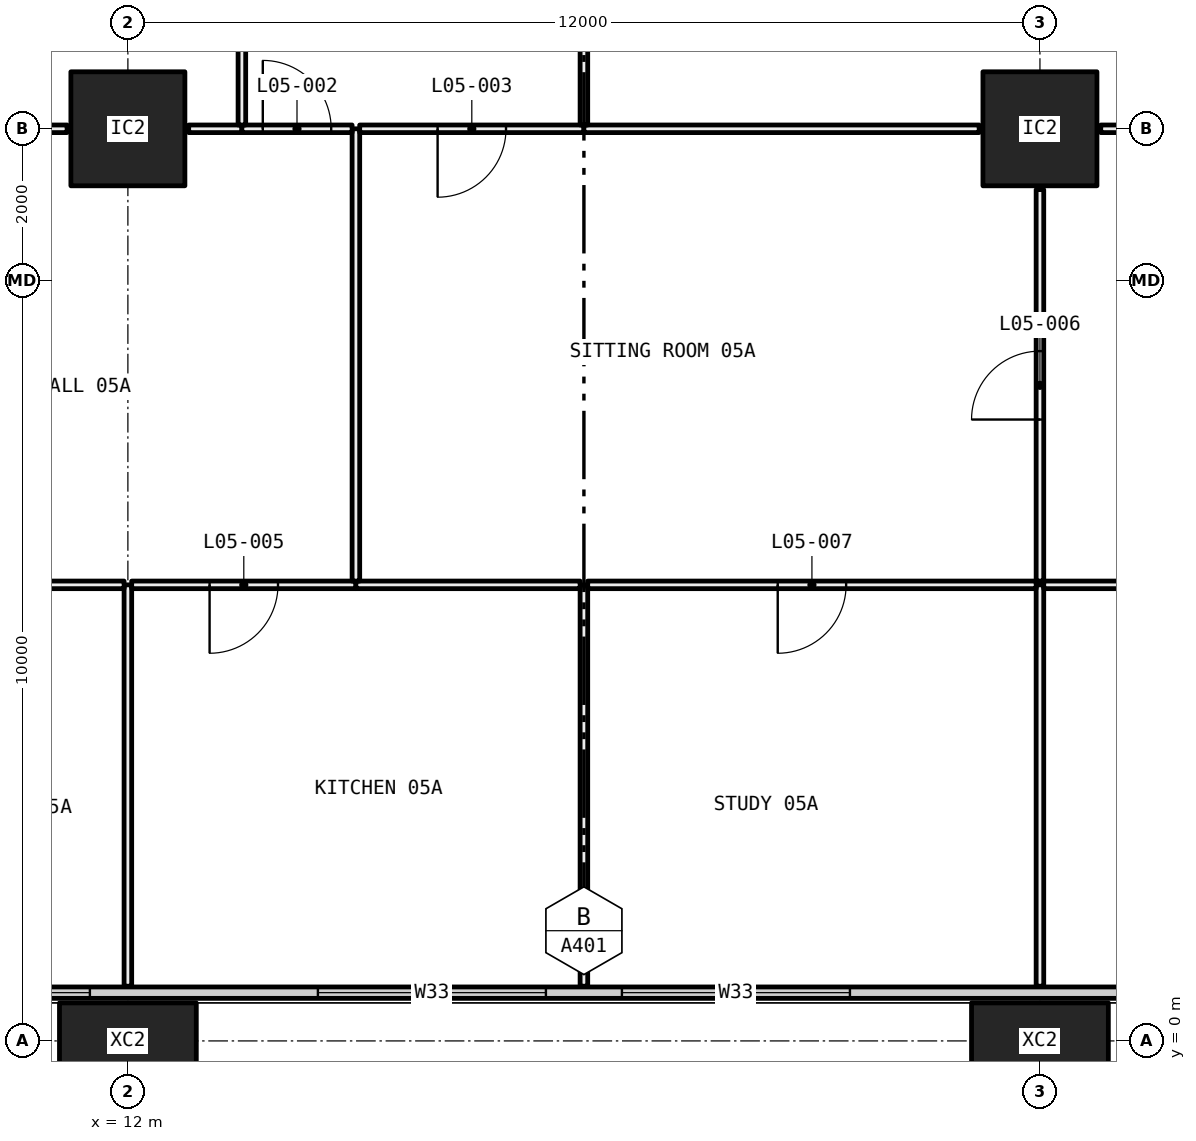
"""IFC4 building model, lengths in metres.
Left out: names, types, materials, properties, quantities, classifications, styles, units other than length and angle.
Written with IfcOpenShell. Run it as: python <this file> out.ifc"""

import sys

from ifc_helpers import new_model, si_unit, direction, frame, frame_2d, origin, origin_2d, place, context, subcontext, project, spatial, rectangle, hollow_rectangle, extrude, element, fill, save


model = new_model("IFC4")
c1 = context("Model", 3, precision=1e-05, world=origin(), true_north=direction((0.0, 1.0)))
c2 = subcontext(c1, "Body", "Model", "MODEL_VIEW")
j1 = project(units=[si_unit("LENGTHUNIT", "METRE"), si_unit("PLANEANGLEUNIT", "RADIAN")], contexts=[c1])
p1 = place(None, origin())
s1 = spatial("IfcSite", under=j1, at=p1, CompositionType="ELEMENT")
p2 = place(p1, origin())
s2 = spatial("IfcBuilding", under=s1, at=p2, CompositionType="ELEMENT")
p3 = place(p2, frame((0.0, 0.0, 30.0)))
s3 = spatial("IfcBuildingStorey", under=s2, at=p3, CompositionType="ELEMENT", Elevation=30.0)
p4 = place(p3, frame((12.0, 0.0, -0.4), z_axis=(0.0, 0.0, 1.0), x_axis=(1.0, 0.0, 0.0)))
e1 = element("IfcColumn", 1, at=p4, inside=s3, PredefinedType="COLUMN", context=c2, shape_type="SweptSolid", body=[
    extrude(hollow_rectangle(XDim=1.8, YDim=1.0, WallThickness=0.07, at=origin_2d()), origin(), (0.0, 0.0, 1.0), 3.45),
])
p5 = place(p3, frame((12.0, 12.0, 0.0), z_axis=(0.0, 0.0, 1.0), x_axis=(1.0, 0.0, 0.0)))
e2 = element("IfcColumn", 2, at=p5, inside=s3, PredefinedType="COLUMN", context=c2, shape_type="SweptSolid", body=[
    extrude(hollow_rectangle(XDim=1.5, YDim=1.5, WallThickness=0.065, at=origin_2d()), origin(), (0.0, 0.0, 1.0), 3.05),
])
p6 = place(p3, frame((24.0, 0.0, -0.4), z_axis=(0.0, 0.0, 1.0), x_axis=(1.0, 0.0, 0.0)))
e3 = element("IfcColumn", 3, at=p6, inside=s3, PredefinedType="COLUMN", context=c2, shape_type="SweptSolid", body=[
    extrude(hollow_rectangle(XDim=1.8, YDim=1.0, WallThickness=0.07, at=origin_2d()), origin(), (0.0, 0.0, 1.0), 3.45),
])
p7 = place(p3, frame((24.0, 12.0, 0.0), z_axis=(0.0, 0.0, 1.0), x_axis=(1.0, 0.0, 0.0)))
e4 = element("IfcColumn", 4, at=p7, inside=s3, PredefinedType="COLUMN", context=c2, shape_type="SweptSolid", body=[
    extrude(hollow_rectangle(XDim=1.5, YDim=1.5, WallThickness=0.065, at=origin_2d()), origin(), (0.0, 0.0, 1.0), 3.05),
])
p8 = place(p3, frame((6.56, 0.635, 0.0), z_axis=(0.0, 0.0, 1.0), x_axis=(1.0, 0.0, 0.0)))
e5 = element("IfcWall", 5, at=p8, inside=s3, PredefinedType="ELEMENTEDWALL", context=c2, shape_type="SweptSolid", body=[
    extrude(rectangle(XDim=58.88, YDim=0.15, at=frame_2d((29.44, 0.0))), origin(), (0.0, 0.0, 1.0), 3.05),
])
p9 = place(p8, frame((0.44, 0.0, 0.45)))
e6 = element("IfcOpeningElement", 6, at=p9, cuts=e5, PredefinedType="OPENING", context=c2, shape_type="SweptSolid", body=[
    extrude(rectangle(XDim=4.5, YDim=2.55, at=frame_2d((2.25, 1.275))), frame((0.0, 0.085, 0.0), z_axis=(0.0, -1.0, 0.0), x_axis=(1.0, 0.0, 0.0)), (0.0, 0.0, 1.0), 0.17),
])
p10 = place(p8, frame((7.94, 0.0, 0.45)))
e7 = element("IfcOpeningElement", 7, at=p10, cuts=e5, PredefinedType="OPENING", context=c2, shape_type="SweptSolid", body=[
    extrude(rectangle(XDim=3.0, YDim=2.55, at=frame_2d((1.5, 1.275))), frame((0.0, 0.085, 0.0), z_axis=(0.0, -1.0, 0.0), x_axis=(1.0, 0.0, 0.0)), (0.0, 0.0, 1.0), 0.17),
])
p11 = place(p8, frame((11.94, 0.0, 0.45)))
e8 = element("IfcOpeningElement", 8, at=p11, cuts=e5, PredefinedType="OPENING", context=c2, shape_type="SweptSolid", body=[
    extrude(rectangle(XDim=3.0, YDim=2.55, at=frame_2d((1.5, 1.275))), frame((0.0, 0.085, 0.0), z_axis=(0.0, -1.0, 0.0), x_axis=(1.0, 0.0, 0.0)), (0.0, 0.0, 1.0), 0.17),
])
p12 = place(p8, frame((19.94, 0.0, 0.45)))
e9 = element("IfcOpeningElement", 9, at=p12, cuts=e5, PredefinedType="OPENING", context=c2, shape_type="SweptSolid", body=[
    extrude(rectangle(XDim=3.0, YDim=2.55, at=frame_2d((1.5, 1.275))), frame((0.0, 0.085, 0.0), z_axis=(0.0, -1.0, 0.0), x_axis=(1.0, 0.0, 0.0)), (0.0, 0.0, 1.0), 0.17),
])
p13 = place(p8, frame((23.94, 0.0, 0.45)))
e10 = element("IfcOpeningElement", 10, at=p13, cuts=e5, PredefinedType="OPENING", context=c2, shape_type="SweptSolid", body=[
    extrude(rectangle(XDim=2.0, YDim=2.55, at=frame_2d((1.0, 1.275))), frame((0.0, 0.085, 0.0), z_axis=(0.0, -1.0, 0.0), x_axis=(1.0, 0.0, 0.0)), (0.0, 0.0, 1.0), 0.17),
])
p14 = place(p8, frame((31.94, 0.0, 0.45)))
e11 = element("IfcOpeningElement", 11, at=p14, cuts=e5, PredefinedType="OPENING", context=c2, shape_type="SweptSolid", body=[
    extrude(rectangle(XDim=3.0, YDim=2.55, at=frame_2d((1.5, 1.275))), frame((0.0, 0.085, 0.0), z_axis=(0.0, -1.0, 0.0), x_axis=(1.0, 0.0, 0.0)), (0.0, 0.0, 1.0), 0.17),
])
p15 = place(p8, frame((35.94, 0.0, 0.45)))
e12 = element("IfcOpeningElement", 12, at=p15, cuts=e5, PredefinedType="OPENING", context=c2, shape_type="SweptSolid", body=[
    extrude(rectangle(XDim=3.0, YDim=2.55, at=frame_2d((1.5, 1.275))), frame((0.0, 0.085, 0.0), z_axis=(0.0, -1.0, 0.0), x_axis=(1.0, 0.0, 0.0)), (0.0, 0.0, 1.0), 0.17),
])
p16 = place(p8, frame((43.94, 0.0, 0.45)))
e13 = element("IfcOpeningElement", 13, at=p16, cuts=e5, PredefinedType="OPENING", context=c2, shape_type="SweptSolid", body=[
    extrude(rectangle(XDim=3.0, YDim=2.55, at=frame_2d((1.5, 1.275))), frame((0.0, 0.085, 0.0), z_axis=(0.0, -1.0, 0.0), x_axis=(1.0, 0.0, 0.0)), (0.0, 0.0, 1.0), 0.17),
])
p17 = place(p8, frame((47.94, 0.0, 0.45)))
e14 = element("IfcOpeningElement", 14, at=p17, cuts=e5, PredefinedType="OPENING", context=c2, shape_type="SweptSolid", body=[
    extrude(rectangle(XDim=2.0, YDim=2.55, at=frame_2d((1.0, 1.275))), frame((0.0, 0.085, 0.0), z_axis=(0.0, -1.0, 0.0), x_axis=(1.0, 0.0, 0.0)), (0.0, 0.0, 1.0), 0.17),
])
p18 = place(p8, frame((53.94, 0.0, 0.45)))
e15 = element("IfcOpeningElement", 15, at=p18, cuts=e5, PredefinedType="OPENING", context=c2, shape_type="SweptSolid", body=[
    extrude(rectangle(XDim=4.5, YDim=2.55, at=frame_2d((2.25, 1.275))), frame((0.0, 0.085, 0.0), z_axis=(0.0, -1.0, 0.0), x_axis=(1.0, 0.0, 0.0)), (0.0, 0.0, 1.0), 0.17),
])
p19 = place(p3, frame((12.0, 0.72, 0.0), z_axis=(0.0, 0.0, 1.0), x_axis=(0.0, 1.0, 0.0)))
e16 = element("IfcWall", 16, at=p19, inside=s3, PredefinedType="PARTITIONING", context=c2, shape_type="SweptSolid", body=[
    extrude(rectangle(XDim=5.28, YDim=0.1, at=frame_2d((2.64, 0.0))), origin(), (0.0, 0.0, 1.0), 2.45),
])
p20 = place(p3, frame((11.95, 6.0, 0.0), z_axis=(0.0, 0.0, 1.0), x_axis=(-1.0, 0.0, 0.0)))
e17 = element("IfcWall", 17, at=p20, inside=s3, PredefinedType="PARTITIONING", context=c2, shape_type="SweptSolid", body=[
    extrude(rectangle(XDim=5.23, YDim=0.1, at=frame_2d((2.615, 0.0))), origin(), (0.0, 0.0, 1.0), 2.45),
])
p21 = place(p20, frame((2.165, 0.0, 0.0)))
e18 = element("IfcOpeningElement", 18, at=p21, cuts=e17, PredefinedType="OPENING", context=c2, shape_type="SweptSolid", body=[
    extrude(rectangle(XDim=0.9, YDim=2.1, at=frame_2d((0.45, 1.05))), frame((0.0, 0.06, 0.0), z_axis=(0.0, -1.0, 0.0), x_axis=(1.0, 0.0, 0.0)), (0.0, 0.0, 1.0), 0.12),
])
p22 = place(p3, frame((18.0, 0.72, 0.0), z_axis=(0.0, 0.0, 1.0), x_axis=(0.0, 1.0, 0.0)))
e19 = element("IfcWall", 19, at=p22, inside=s3, PredefinedType="PARTITIONING", context=c2, shape_type="SweptSolid", body=[
    extrude(rectangle(XDim=5.28, YDim=0.1, at=frame_2d((2.64, 0.0))), origin(), (0.0, 0.0, 1.0), 3.05),
])
p23 = place(p3, frame((15.0, 6.0, 0.0), z_axis=(0.0, 0.0, 1.0), x_axis=(-1.0, 0.0, 0.0)))
e20 = element("IfcWall", 20, at=p23, inside=s3, PredefinedType="PARTITIONING", context=c2, shape_type="SweptSolid", body=[
    extrude(rectangle(XDim=2.95, YDim=0.1, at=frame_2d((1.475, 0.0))), origin(), (0.0, 0.0, 1.0), 2.45),
])
p24 = place(p23, frame((1.025, 0.0, 0.0)))
e21 = element("IfcOpeningElement", 21, at=p24, cuts=e20, PredefinedType="OPENING", context=c2, shape_type="SweptSolid", body=[
    extrude(rectangle(XDim=0.9, YDim=2.1, at=frame_2d((0.45, 1.05))), frame((0.0, 0.06, 0.0), z_axis=(0.0, -1.0, 0.0), x_axis=(1.0, 0.0, 0.0)), (0.0, 0.0, 1.0), 0.12),
])
p25 = place(p3, frame((17.95, 6.0, 0.0), z_axis=(0.0, 0.0, 1.0), x_axis=(-1.0, 0.0, 0.0)))
e22 = element("IfcWall", 22, at=p25, inside=s3, PredefinedType="PARTITIONING", context=c2, shape_type="SweptSolid", body=[
    extrude(rectangle(XDim=2.95, YDim=0.1, at=frame_2d((1.475, 0.0))), origin(), (0.0, 0.0, 1.0), 3.05),
])
p26 = place(p3, frame((24.0, 0.72, 0.0), z_axis=(0.0, 0.0, 1.0), x_axis=(0.0, 1.0, 0.0)))
e23 = element("IfcWall", 23, at=p26, inside=s3, PredefinedType="PARTITIONING", context=c2, shape_type="SweptSolid", body=[
    extrude(rectangle(XDim=5.28, YDim=0.1, at=frame_2d((2.64, 0.0))), origin(), (0.0, 0.0, 1.0), 2.45),
])
p27 = place(p3, frame((23.95, 6.0, 0.0), z_axis=(0.0, 0.0, 1.0), x_axis=(-1.0, 0.0, 0.0)))
e24 = element("IfcWall", 24, at=p27, inside=s3, PredefinedType="PARTITIONING", context=c2, shape_type="SweptSolid", body=[
    extrude(rectangle(XDim=5.9, YDim=0.1, at=frame_2d((2.95, 0.0))), origin(), (0.0, 0.0, 1.0), 2.45),
])
p28 = place(p27, frame((2.5, 0.0, 0.0)))
e25 = element("IfcOpeningElement", 25, at=p28, cuts=e24, PredefinedType="OPENING", context=c2, shape_type="SweptSolid", body=[
    extrude(rectangle(XDim=0.9, YDim=2.1, at=frame_2d((0.45, 1.05))), frame((0.0, 0.06, 0.0), z_axis=(0.0, -1.0, 0.0), x_axis=(1.0, 0.0, 0.0)), (0.0, 0.0, 1.0), 0.12),
])
p29 = place(p3, frame((29.95, 6.0, 0.0), z_axis=(0.0, 0.0, 1.0), x_axis=(-1.0, 0.0, 0.0)))
e26 = element("IfcWall", 26, at=p29, inside=s3, PredefinedType="PARTITIONING", context=c2, shape_type="SweptSolid", body=[
    extrude(rectangle(XDim=5.9, YDim=0.1, at=frame_2d((2.95, 0.0))), origin(), (0.0, 0.0, 1.0), 2.45),
])
p30 = place(p29, frame((2.5, 0.0, 0.0)))
e27 = element("IfcOpeningElement", 27, at=p30, cuts=e26, PredefinedType="OPENING", context=c2, shape_type="SweptSolid", body=[
    extrude(rectangle(XDim=0.9, YDim=2.1, at=frame_2d((0.45, 1.05))), frame((0.0, 0.06, 0.0), z_axis=(0.0, -1.0, 0.0), x_axis=(1.0, 0.0, 0.0)), (0.0, 0.0, 1.0), 0.12),
])
p31 = place(p3, frame((15.0, 6.05, 0.0), z_axis=(0.0, 0.0, 1.0), x_axis=(0.0, 1.0, 0.0)))
e28 = element("IfcWall", 28, at=p31, inside=s3, PredefinedType="PARTITIONING", context=c2, shape_type="SweptSolid", body=[
    extrude(rectangle(XDim=5.95, YDim=0.1, at=frame_2d((2.975, 0.0))), origin(), (0.0, 0.0, 1.0), 2.45),
])
p32 = place(p3, frame((11.2, 12.0, 0.0), z_axis=(0.0, 0.0, 1.0), x_axis=(-1.0, 0.0, 0.0)))
e29 = element("IfcWall", 29, at=p32, inside=s3, PredefinedType="PARTITIONING", context=c2, shape_type="SweptSolid", body=[
    extrude(rectangle(XDim=5.15, YDim=0.1, at=frame_2d((2.575, 0.0))), origin(), (0.0, 0.0, 1.0), 2.45),
])
p33 = place(p32, frame((2.125, 0.0, 0.0)))
e30 = element("IfcOpeningElement", 30, at=p33, cuts=e29, PredefinedType="OPENING", context=c2, shape_type="SweptSolid", body=[
    extrude(rectangle(XDim=0.9, YDim=2.1, at=frame_2d((0.45, 1.05))), frame((0.0, 0.06, 0.0), z_axis=(0.0, -1.0, 0.0), x_axis=(1.0, 0.0, 0.0)), (0.0, 0.0, 1.0), 0.12),
])
p34 = place(p3, frame((13.5, 12.0, 0.0), z_axis=(0.0, 0.0, 1.0), x_axis=(-1.0, 0.0, 0.0)))
e31 = element("IfcWall", 31, at=p34, inside=s3, PredefinedType="PARTITIONING", context=c2, shape_type="SweptSolid", body=[
    extrude(rectangle(XDim=0.7, YDim=0.1, at=frame_2d((0.35, 0.0))), origin(), (0.0, 0.0, 1.0), 2.45),
])
p35 = place(p3, frame((14.95, 12.0, 0.0), z_axis=(0.0, 0.0, 1.0), x_axis=(-1.0, 0.0, 0.0)))
e32 = element("IfcWall", 32, at=p35, inside=s3, PredefinedType="PARTITIONING", context=c2, shape_type="SweptSolid", body=[
    extrude(rectangle(XDim=1.45, YDim=0.1, at=frame_2d((0.725, 0.0))), origin(), (0.0, 0.0, 1.0), 2.45),
])
p36 = place(p35, frame((0.275, 0.0, 0.0)))
e33 = element("IfcOpeningElement", 33, at=p36, cuts=e32, PredefinedType="OPENING", context=c2, shape_type="SweptSolid", body=[
    extrude(rectangle(XDim=0.9, YDim=2.1, at=frame_2d((0.45, 1.05))), frame((0.0, 0.06, 0.0), z_axis=(0.0, -1.0, 0.0), x_axis=(1.0, 0.0, 0.0)), (0.0, 0.0, 1.0), 0.12),
])
p37 = place(p3, frame((24.0, 6.05, 0.0), z_axis=(0.0, 0.0, 1.0), x_axis=(0.0, 1.0, 0.0)))
e34 = element("IfcWall", 34, at=p37, inside=s3, PredefinedType="PARTITIONING", context=c2, shape_type="SweptSolid", body=[
    extrude(rectangle(XDim=5.15, YDim=0.1, at=frame_2d((2.575, 0.0))), origin(), (0.0, 0.0, 1.0), 2.45),
])
p38 = place(p37, frame((2.125, 0.0, 0.0)))
e35 = element("IfcOpeningElement", 35, at=p38, cuts=e34, PredefinedType="OPENING", context=c2, shape_type="SweptSolid", body=[
    extrude(rectangle(XDim=0.9, YDim=2.1, at=frame_2d((0.45, 1.05))), frame((0.0, 0.06, 0.0), z_axis=(0.0, -1.0, 0.0), x_axis=(1.0, 0.0, 0.0)), (0.0, 0.0, 1.0), 0.12),
])
p39 = place(p3, frame((18.0, 12.0, 0.0), z_axis=(0.0, 0.0, 1.0), x_axis=(-1.0, 0.0, 0.0)))
e36 = element("IfcWall", 36, at=p39, inside=s3, PredefinedType="PARTITIONING", context=c2, shape_type="SweptSolid", body=[
    extrude(rectangle(XDim=2.95, YDim=0.1, at=frame_2d((1.475, 0.0))), origin(), (0.0, 0.0, 1.0), 2.45),
])
p40 = place(p39, frame((1.025, 0.0, 0.0)))
e37 = element("IfcOpeningElement", 37, at=p40, cuts=e36, PredefinedType="OPENING", context=c2, shape_type="SweptSolid", body=[
    extrude(rectangle(XDim=0.9, YDim=2.1, at=frame_2d((0.45, 1.05))), frame((0.0, 0.06, 0.0), z_axis=(0.0, -1.0, 0.0), x_axis=(1.0, 0.0, 0.0)), (0.0, 0.0, 1.0), 0.12),
])
p41 = place(p3, frame((23.2, 12.0, 0.0), z_axis=(0.0, 0.0, 1.0), x_axis=(-1.0, 0.0, 0.0)))
e38 = element("IfcWall", 38, at=p41, inside=s3, PredefinedType="PARTITIONING", context=c2, shape_type="SweptSolid", body=[
    extrude(rectangle(XDim=5.2, YDim=0.1, at=frame_2d((2.6, 0.0))), origin(), (0.0, 0.0, 1.0), 2.45),
])
p42 = place(p3, frame((27.0, 12.0, 0.0), z_axis=(0.0, 0.0, 1.0), x_axis=(-1.0, 0.0, 0.0)))
e39 = element("IfcWall", 39, at=p42, inside=s3, PredefinedType="PARTITIONING", context=c2, shape_type="SweptSolid", body=[
    extrude(rectangle(XDim=2.2, YDim=0.1, at=frame_2d((1.1, 0.0))), origin(), (0.0, 0.0, 1.0), 2.45),
])
p43 = place(p3, frame((13.5, 12.05, 0.0), z_axis=(0.0, 0.0, 1.0), x_axis=(0.0, 1.0, 0.0)))
e40 = element("IfcWall", 40, at=p43, inside=s3, PredefinedType="PARTITIONING", context=c2, shape_type="SweptSolid", body=[
    extrude(rectangle(XDim=5.85, YDim=0.1, at=frame_2d((2.925, 0.0))), origin(), (0.0, 0.0, 1.0), 2.45),
])
p44 = place(p3, frame((18.0, 12.05, 0.0), z_axis=(0.0, 0.0, 1.0), x_axis=(0.0, 1.0, 0.0)))
e41 = element("IfcWall", 41, at=p44, inside=s3, PredefinedType="PARTITIONING", context=c2, shape_type="SweptSolid", body=[
    extrude(rectangle(XDim=5.85, YDim=0.1, at=frame_2d((2.925, 0.0))), origin(), (0.0, 0.0, 1.0), 2.45),
])
p45 = place(p44, frame((2.475, 0.0, 0.0)))
e42 = element("IfcOpeningElement", 42, at=p45, cuts=e41, PredefinedType="OPENING", context=c2, shape_type="SweptSolid", body=[
    extrude(rectangle(XDim=0.9, YDim=2.1, at=frame_2d((0.45, 1.05))), frame((0.0, 0.06, 0.0), z_axis=(0.0, -1.0, 0.0), x_axis=(1.0, 0.0, 0.0)), (0.0, 0.0, 1.0), 0.12),
])
p46 = place(p9, origin())
e43 = element("IfcWindow", 43, at=p46, inside=s3, PartitioningType="SINGLE_PANEL", PredefinedType="WINDOW", context=c2, shape_type="SweptSolid", body=[
    extrude(rectangle(XDim=4.5, YDim=2.55, at=frame_2d((2.25, 1.275))), frame((0.0, 0.03, 0.0), z_axis=(0.0, -1.0, 0.0), x_axis=(1.0, 0.0, 0.0)), (0.0, 0.0, 1.0), 0.06),
])
fill(e6, e43)
p47 = place(p10, origin())
e44 = element("IfcWindow", 44, at=p47, inside=s3, PartitioningType="SINGLE_PANEL", PredefinedType="WINDOW", context=c2, shape_type="SweptSolid", body=[
    extrude(rectangle(XDim=3.0, YDim=2.55, at=frame_2d((1.5, 1.275))), frame((0.0, 0.03, 0.0), z_axis=(0.0, -1.0, 0.0), x_axis=(1.0, 0.0, 0.0)), (0.0, 0.0, 1.0), 0.06),
])
fill(e7, e44)
p48 = place(p11, origin())
e45 = element("IfcWindow", 45, at=p48, inside=s3, PartitioningType="SINGLE_PANEL", PredefinedType="WINDOW", context=c2, shape_type="SweptSolid", body=[
    extrude(rectangle(XDim=3.0, YDim=2.55, at=frame_2d((1.5, 1.275))), frame((0.0, 0.03, 0.0), z_axis=(0.0, -1.0, 0.0), x_axis=(1.0, 0.0, 0.0)), (0.0, 0.0, 1.0), 0.06),
])
fill(e8, e45)
p49 = place(p36, frame((0.9, 0.0, 0.0), x_axis=(-1.0, 0.0, 0.0)))
e46 = element("IfcDoor", 46, at=p49, inside=s3, OperationType="SINGLE_SWING_RIGHT", PredefinedType="DOOR", context=c2, shape_type="SweptSolid", body=[
    extrude(rectangle(XDim=0.9, YDim=2.1, at=frame_2d((0.45, 1.05))), frame((0.0, 0.025, 0.0), z_axis=(0.0, -1.0, 0.0), x_axis=(1.0, 0.0, 0.0)), (0.0, 0.0, 1.0), 0.05),
])
fill(e33, e46)
p50 = place(p40, origin())
e47 = element("IfcDoor", 47, at=p50, inside=s3, OperationType="SINGLE_SWING_LEFT", PredefinedType="DOOR", context=c2, shape_type="SweptSolid", body=[
    extrude(rectangle(XDim=0.9, YDim=2.1, at=frame_2d((0.45, 1.05))), frame((0.0, 0.025, 0.0), z_axis=(0.0, -1.0, 0.0), x_axis=(1.0, 0.0, 0.0)), (0.0, 0.0, 1.0), 0.05),
])
fill(e37, e47)
p51 = place(p24, origin())
e48 = element("IfcDoor", 48, at=p51, inside=s3, OperationType="SINGLE_SWING_LEFT", PredefinedType="DOOR", context=c2, shape_type="SweptSolid", body=[
    extrude(rectangle(XDim=0.9, YDim=2.1, at=frame_2d((0.45, 1.05))), frame((0.0, 0.025, 0.0), z_axis=(0.0, -1.0, 0.0), x_axis=(1.0, 0.0, 0.0)), (0.0, 0.0, 1.0), 0.05),
])
fill(e21, e48)
p52 = place(p38, origin())
e49 = element("IfcDoor", 49, at=p52, inside=s3, OperationType="SINGLE_SWING_RIGHT", PredefinedType="DOOR", context=c2, shape_type="SweptSolid", body=[
    extrude(rectangle(XDim=0.9, YDim=2.1, at=frame_2d((0.45, 1.05))), frame((0.0, 0.025, 0.0), z_axis=(0.0, -1.0, 0.0), x_axis=(1.0, 0.0, 0.0)), (0.0, 0.0, 1.0), 0.05),
])
fill(e35, e49)
p53 = place(p28, origin())
e50 = element("IfcDoor", 50, at=p53, inside=s3, OperationType="SINGLE_SWING_LEFT", PredefinedType="DOOR", context=c2, shape_type="SweptSolid", body=[
    extrude(rectangle(XDim=0.9, YDim=2.1, at=frame_2d((0.45, 1.05))), frame((0.0, 0.025, 0.0), z_axis=(0.0, -1.0, 0.0), x_axis=(1.0, 0.0, 0.0)), (0.0, 0.0, 1.0), 0.05),
])
fill(e25, e50)
save(model, sys.argv[1])
